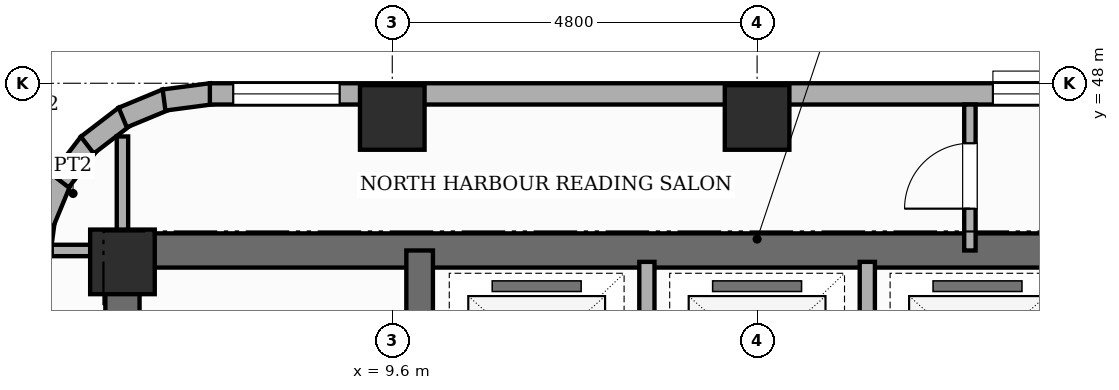
"""IFC4 building model, lengths in metres.
Left out: names, types, materials, properties, quantities, classifications, styles, units other than length and angle.
Written with IfcOpenShell. Run it as: python <this file> out.ifc"""

import sys

from ifc_helpers import new_model, si_unit, direction, frame, frame_2d, origin, origin_2d, place, context, subcontext, project, spatial, rectangle, extrude, element, fill, save


model = new_model("IFC4")
c1 = context("Model", 3, precision=1e-05, world=origin(), true_north=direction((0.0, 1.0)))
c2 = subcontext(c1, "Body", "Model", "MODEL_VIEW")
j1 = project(units=[si_unit("LENGTHUNIT", "METRE"), si_unit("PLANEANGLEUNIT", "RADIAN")], contexts=[c1])
p1 = place(None, origin())
s1 = spatial("IfcSite", under=j1, at=p1, CompositionType="ELEMENT")
p2 = place(p1, origin())
s2 = spatial("IfcBuilding", under=s1, at=p2, CompositionType="ELEMENT")
p3 = place(p2, frame((0.0, 0.0, 211.0)))
s3 = spatial("IfcBuildingStorey", under=s2, at=p3, CompositionType="ELEMENT", Elevation=211.0)
p4 = place(p3, frame((6.05, 30.675, 0.0), z_axis=(0.0, 0.0, 1.0), x_axis=(0.0, 1.0, 0.0)))
e1 = element("IfcWall", 1, at=p4, inside=s3, PredefinedType="SHEAR", context=c2, shape_type="SweptSolid", body=[
    extrude(rectangle(XDim=15.35, YDim=0.45, at=frame_2d((7.675, 0.0))), origin(), (0.0, 0.0, 1.0), 3.6),
])
p5 = place(p4, frame((10.675, 0.0, 0.0)))
e2 = element("IfcOpeningElement", 2, at=p5, cuts=e1, PredefinedType="OPENING", context=c2, shape_type="SweptSolid", body=[
    extrude(rectangle(XDim=0.95, YDim=2.15, at=frame_2d((0.475, 1.075))), frame((0.0, 0.235, 0.0), z_axis=(0.0, -1.0, 0.0), x_axis=(1.0, 0.0, 0.0)), (0.0, 0.0, 1.0), 0.47),
])
p6 = place(p3, frame((6.05, 45.8, 0.0), z_axis=(0.0, 0.0, 1.0), x_axis=(1.0, 0.0, 0.0)))
e3 = element("IfcWall", 3, at=p6, inside=s3, PredefinedType="SHEAR", context=c2, shape_type="SweptSolid", body=[
    extrude(rectangle(XDim=16.7, YDim=0.45, at=frame_2d((8.35, 0.0))), origin(), (0.0, 0.0, 1.0), 3.6),
])
p7 = place(p3, frame((9.96, 30.9, 0.0), z_axis=(0.0, 0.0, 1.0), x_axis=(0.0, 1.0, 0.0)))
e4 = element("IfcWall", 4, at=p7, inside=s3, PredefinedType="SHEAR", context=c2, shape_type="SweptSolid", body=[
    extrude(rectangle(XDim=14.9, YDim=0.35, at=frame_2d((7.45, 0.0))), origin(), (0.0, 0.0, 1.0), 3.6),
])
p8 = place(p7, frame((0.65, 0.0, 0.0)))
e5 = element("IfcOpeningElement", 5, at=p8, cuts=e4, PredefinedType="OPENING", context=c2, shape_type="SweptSolid", body=[
    extrude(rectangle(XDim=0.95, YDim=2.1, at=frame_2d((0.475, 1.05))), frame((0.0, 0.185, 0.0), z_axis=(0.0, -1.0, 0.0), x_axis=(1.0, 0.0, 0.0)), (0.0, 0.0, 1.0), 0.37),
])
p9 = place(p7, frame((10.45, 0.0, 0.0)))
e6 = element("IfcOpeningElement", 6, at=p9, cuts=e4, PredefinedType="OPENING", context=c2, shape_type="SweptSolid", body=[
    extrude(rectangle(XDim=1.0, YDim=2.15, at=frame_2d((0.5, 1.075))), frame((0.0, 0.185, 0.0), z_axis=(0.0, -1.0, 0.0), x_axis=(1.0, 0.0, 0.0)), (0.0, 0.0, 1.0), 0.37),
])
for number, where, z_axis, x_axis in (
    (7, (6.05, 45.65, 0.0), (0.0, 0.0, 1.0), (1.0, 0.0, 0.0)),
    (8, (9.6, 47.55, 0.0), (0.0, 0.0, 1.0), (1.0, 0.0, 0.0)),
    (9, (14.4, 47.55, 0.0), (0.0, 0.0, 1.0), (1.0, 0.0, 0.0)),
):
    element("IfcColumn", number, at=place(p3, frame(where, z_axis=z_axis, x_axis=x_axis)), inside=s3, PredefinedType="COLUMN", context=c2, shape_type="SweptSolid", body=[
        extrude(rectangle(XDim=0.85, YDim=0.85, at=origin_2d()), origin(), (0.0, 0.0, 1.0), 3.6),
    ])
for number, where, z_axis, x_axis in (
    (10, (4.939, 45.582, 0.0), (0.0, 0.0, 1.0), (0.131, 0.991, 0.0)),
    (11, (5.011, 46.167, 0.0), (0.0, 0.0, 1.0), (0.383, 0.924, 0.0)),
    (12, (5.233, 46.715, 0.0), (0.0, 0.0, 1.0), (0.609, 0.793, 0.0)),
    (13, (5.588, 47.186, 0.0), (0.0, 0.0, 1.0), (0.793, 0.609, 0.0)),
):
    element("IfcWall", number, at=place(p3, frame(where, z_axis=z_axis, x_axis=x_axis)), inside=s3, PredefinedType="STANDARD", context=c2, shape_type="SweptSolid", body=[
        extrude(rectangle(XDim=0.626, YDim=0.28, at=frame_2d((0.313, 0.0))), origin(), (0.0, 0.0, 1.0), 3.38),
    ])
p10 = place(p3, frame((6.054, 47.549, 0.0), z_axis=(0.0, 0.0, 1.0), x_axis=(0.923974080304, 0.382455093999, 0.0)))
e14 = element("IfcWall", 14, at=p10, inside=s3, PredefinedType="STANDARD", context=c2, shape_type="SweptSolid", body=[
    extrude(rectangle(XDim=0.626, YDim=0.28, at=frame_2d((0.313, 0.0))), origin(), (0.0, 0.0, 1.0), 3.38),
])
p11 = place(p3, frame((6.597, 47.779, 0.0), z_axis=(0.0, 0.0, 1.0), x_axis=(0.9914410257, 0.130555323746, 0.0)))
e15 = element("IfcWall", 15, at=p11, inside=s3, PredefinedType="STANDARD", context=c2, shape_type="SweptSolid", body=[
    extrude(rectangle(XDim=0.626, YDim=0.28, at=frame_2d((0.313, 0.0))), origin(), (0.0, 0.0, 1.0), 3.38),
])
p12 = place(p3, frame((7.2, 47.86, 0.0), z_axis=(0.0, 0.0, 1.0), x_axis=(1.0, 0.0, 0.0)))
e16 = element("IfcWall", 16, at=p12, inside=s3, PredefinedType="STANDARD", context=c2, shape_type="SweptSolid", body=[
    extrude(rectangle(XDim=43.2, YDim=0.28, at=frame_2d((21.6, 0.0))), origin(), (0.0, 0.0, 1.0), 2.66),
])
p13 = place(p12, frame((28.866, 0.0, 0.65)))
e17 = element("IfcOpeningElement", 17, at=p13, cuts=e16, PredefinedType="OPENING", context=c2, shape_type="SweptSolid", body=[
    extrude(rectangle(XDim=1.4, YDim=1.1, at=frame_2d((0.7, 0.55))), frame((0.0, 0.15, 0.0), z_axis=(0.0, -1.0, 0.0), x_axis=(1.0, 0.0, 0.0)), (0.0, 0.0, 1.0), 0.3),
])
p14 = place(p12, frame((41.49, 0.0, 0.65)))
e18 = element("IfcOpeningElement", 18, at=p14, cuts=e16, PredefinedType="OPENING", context=c2, shape_type="SweptSolid", body=[
    extrude(rectangle(XDim=1.4, YDim=1.1, at=frame_2d((0.7, 0.55))), frame((0.0, 0.15, 0.0), z_axis=(0.0, -1.0, 0.0), x_axis=(1.0, 0.0, 0.0)), (0.0, 0.0, 1.0), 0.3),
])
p15 = place(p12, frame((18.74, 0.0, 0.45)))
e19 = element("IfcOpeningElement", 19, at=p15, cuts=e16, PredefinedType="OPENING", context=c2, shape_type="SweptSolid", body=[
    extrude(rectangle(XDim=0.95, YDim=1.8, at=frame_2d((0.475, 0.9))), frame((0.0, 0.15, 0.0), z_axis=(0.0, -1.0, 0.0), x_axis=(1.0, 0.0, 0.0)), (0.0, 0.0, 1.0), 0.3),
])
p16 = place(p12, frame((37.887, 0.0, 0.65)))
e20 = element("IfcOpeningElement", 20, at=p16, cuts=e16, PredefinedType="OPENING", context=c2, shape_type="SweptSolid", body=[
    extrude(rectangle(XDim=1.4, YDim=1.1, at=frame_2d((0.7, 0.55))), frame((0.0, 0.15, 0.0), z_axis=(0.0, -1.0, 0.0), x_axis=(1.0, 0.0, 0.0)), (0.0, 0.0, 1.0), 0.3),
])
p17 = place(p12, frame((0.308, 0.0, 0.65)))
e21 = element("IfcOpeningElement", 21, at=p17, cuts=e16, PredefinedType="OPENING", context=c2, shape_type="SweptSolid", body=[
    extrude(rectangle(XDim=1.4, YDim=1.1, at=frame_2d((0.7, 0.55))), frame((0.0, 0.15, 0.0), z_axis=(0.0, -1.0, 0.0), x_axis=(1.0, 0.0, 0.0)), (0.0, 0.0, 1.0), 0.3),
])
p18 = place(p12, frame((10.302, 0.0, 0.45)))
e22 = element("IfcOpeningElement", 22, at=p18, cuts=e16, PredefinedType="OPENING", context=c2, shape_type="SweptSolid", body=[
    extrude(rectangle(XDim=0.95, YDim=1.8, at=frame_2d((0.475, 0.9))), frame((0.0, 0.15, 0.0), z_axis=(0.0, -1.0, 0.0), x_axis=(1.0, 0.0, 0.0)), (0.0, 0.0, 1.0), 0.3),
])
p19 = place(p12, frame((23.492, 0.0, 0.65)))
e23 = element("IfcOpeningElement", 23, at=p19, cuts=e16, PredefinedType="OPENING", context=c2, shape_type="SweptSolid", body=[
    extrude(rectangle(XDim=1.4, YDim=1.1, at=frame_2d((0.7, 0.55))), frame((0.0, 0.15, 0.0), z_axis=(0.0, -1.0, 0.0), x_axis=(1.0, 0.0, 0.0)), (0.0, 0.0, 1.0), 0.3),
])
for number, where, z_axis, x_axis in (
    (24, (12.95, 43.1, 0.0), (0.0, 0.0, 1.0), (0.0, 1.0, 0.0)),
    (25, (15.85, 43.1, 0.0), (0.0, 0.0, 1.0), (0.0, 1.0, 0.0)),
):
    element("IfcWall", number, at=place(p3, frame(where, z_axis=z_axis, x_axis=x_axis)), inside=s3, PredefinedType="POLYGONAL", context=c2, shape_type="SweptSolid", body=[
        extrude(rectangle(XDim=2.55, YDim=0.2, at=frame_2d((1.275, 0.0))), origin(), (0.0, 0.0, 1.0), 3.38),
    ])
p20 = place(p3, frame((5.12, 45.8, 0.0), z_axis=(0.0, 0.0, 1.0), x_axis=(1.0, 0.0, 0.0)))
e26 = element("IfcWall", 26, at=p20, inside=s3, PredefinedType="PARTITIONING", context=c2, shape_type="SweptSolid", body=[
    extrude(rectangle(XDim=0.93, YDim=0.15, at=frame_2d((0.465, 0.0))), origin(), (0.0, 0.0, 1.0), 3.38),
])
p21 = place(p3, frame((6.05, 45.8, 0.0), z_axis=(0.0, 0.0, 1.0), x_axis=(0.0, 1.0, 0.0)))
e27 = element("IfcWall", 27, at=p21, inside=s3, PredefinedType="PARTITIONING", context=c2, shape_type="SweptSolid", body=[
    extrude(rectangle(XDim=1.5, YDim=0.15, at=frame_2d((0.75, 0.0))), origin(), (0.0, 0.0, 1.0), 3.38),
])
p22 = place(p3, frame((17.2, 45.8, 0.0), z_axis=(0.0, 0.0, 1.0), x_axis=(0.0, 1.0, 0.0)))
e28 = element("IfcWall", 28, at=p22, inside=s3, PredefinedType="PARTITIONING", context=c2, shape_type="SweptSolid", body=[
    extrude(rectangle(XDim=1.92, YDim=0.15, at=frame_2d((0.96, 0.0))), origin(), (0.0, 0.0, 1.0), 3.38),
])
p23 = place(p22, frame((0.55, 0.0, 0.0)))
e29 = element("IfcOpeningElement", 29, at=p23, cuts=e28, PredefinedType="OPENING", context=c2, shape_type="SweptSolid", body=[
    extrude(rectangle(XDim=0.86, YDim=2.1, at=frame_2d((0.43, 1.05))), frame((0.0, 0.085, 0.0), z_axis=(0.0, -1.0, 0.0), x_axis=(1.0, 0.0, 0.0)), (0.0, 0.0, 1.0), 0.17),
])
p24 = place(p17, origin())
e30 = element("IfcWindow", 30, at=p24, inside=s3, PartitioningType="SINGLE_PANEL", PredefinedType="WINDOW", context=c2, shape_type="SweptSolid", body=[
    extrude(rectangle(XDim=1.4, YDim=1.1, at=frame_2d((0.7, 0.55))), frame((0.0, 0.03, 0.0), z_axis=(0.0, -1.0, 0.0), x_axis=(1.0, 0.0, 0.0)), (0.0, 0.0, 1.0), 0.06),
])
fill(e21, e30)
p25 = place(p18, origin())
e31 = element("IfcWindow", 31, at=p25, inside=s3, PartitioningType="SINGLE_PANEL", PredefinedType="WINDOW", context=c2, shape_type="SweptSolid", body=[
    extrude(rectangle(XDim=0.95, YDim=1.8, at=frame_2d((0.475, 0.9))), frame((0.0, 0.03, 0.0), z_axis=(0.0, -1.0, 0.0), x_axis=(1.0, 0.0, 0.0)), (0.0, 0.0, 1.0), 0.06),
])
fill(e22, e31)
p26 = place(p23, origin())
e32 = element("IfcDoor", 32, at=p26, inside=s3, OperationType="SINGLE_SWING_LEFT", PredefinedType="DOOR", context=c2, shape_type="SweptSolid", body=[
    extrude(rectangle(XDim=0.86, YDim=2.1, at=frame_2d((0.43, 1.05))), frame((0.0, 0.025, 0.0), z_axis=(0.0, -1.0, 0.0), x_axis=(1.0, 0.0, 0.0)), (0.0, 0.0, 1.0), 0.05),
])
fill(e29, e32)
save(model, sys.argv[1])
